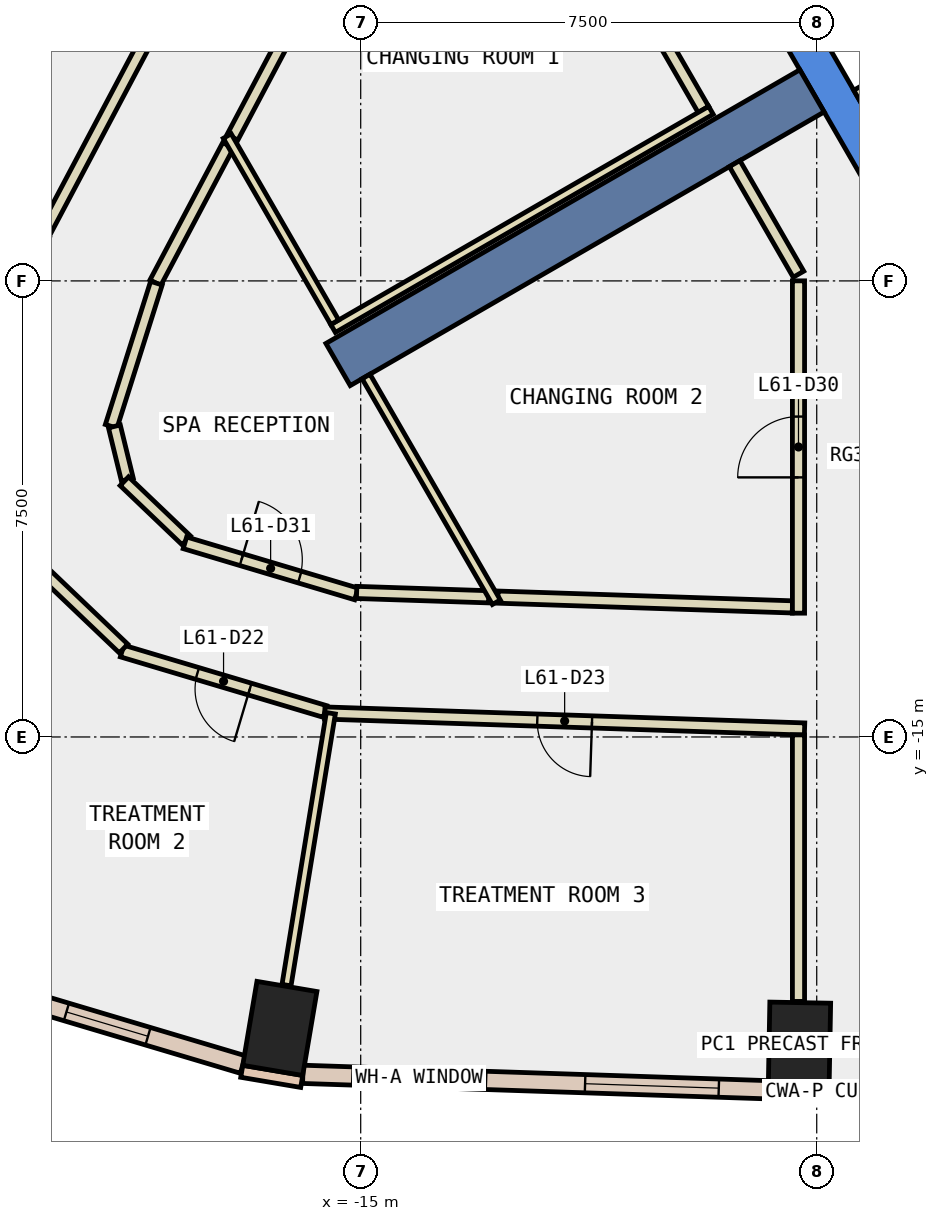
"""IFC4 building model, lengths in metres.
Left out: names, types, materials, properties, quantities, classifications, styles, units other than length and angle.
Written with IfcOpenShell. Run it as: python <this file> out.ifc"""

import sys

from ifc_helpers import new_model, si_unit, direction, frame, frame_2d, origin, origin_2d, place, context, subcontext, project, spatial, polyline, rectangle, outline, extrude, element, fill, save


model = new_model("IFC4")
c1 = context("Model", 3, precision=1e-05, world=origin(), true_north=direction((0.0, 1.0)))
c2 = subcontext(c1, "Body", "Model", "MODEL_VIEW")
j1 = project(units=[si_unit("LENGTHUNIT", "METRE"), si_unit("PLANEANGLEUNIT", "RADIAN")], contexts=[c1])
p1 = place(None, origin())
s1 = spatial("IfcSite", under=j1, at=p1, CompositionType="ELEMENT")
p2 = place(p1, origin())
s2 = spatial("IfcBuilding", under=s1, at=p2, CompositionType="ELEMENT")
p3 = place(p2, frame((0.0, 0.0, 266.6)))
s3 = spatial("IfcBuildingStorey", under=s2, at=p3, CompositionType="ELEMENT", Elevation=266.6)
for number, where, z_axis, x_axis in (
    (1, (-16.33, -19.793, -0.34), (0.0, 0.0, 1.0), (-0.986, 0.167, 0.0)),
    (2, (-7.784, -20.069, -0.34), (0.0, 0.0, 1.0), (-1.0, 0.018, 0.0)),
):
    element("IfcColumn", number, at=place(p3, frame(where, z_axis=z_axis, x_axis=x_axis)), inside=s3, PredefinedType="COLUMN", context=c2, shape_type="SweptSolid", body=[
        extrude(rectangle(XDim=1.0, YDim=1.4, at=origin_2d()), origin(), (0.0, 0.0, 1.0), 3.6),
    ])
p4 = place(p3, frame((0.0, 0.0, -0.34)))
e3 = element("IfcWall", 3, at=p4, inside=s3, PredefinedType="SHEAR", context=c2, shape_type="SweptSolid", body=[
    extrude(outline(polyline([(-11.547, 2.5), (-5.774, -7.5), (-5.427, -6.9), (-10.854, 2.5), (-11.547, 2.5)])), origin(), (0.0, 0.0, 1.0), 3.6),
])
p5 = place(p3, frame((-7.578, -4.375, -0.34), z_axis=(0.0, 0.0, 1.0), x_axis=(-0.866024315419, -0.5000018851, 0.0)))
e4 = element("IfcWall", 4, at=p5, inside=s3, PredefinedType="SHEAR", context=c2, shape_type="SweptSolid", body=[
    extrude(rectangle(XDim=9.0, YDim=0.8, at=frame_2d((4.5, 0.0))), origin(), (0.0, 0.0, 1.0), 3.6),
])
for number, where, z_axis, x_axis in (
    (5, (-16.956, -20.498, 0.0), (0.0, 0.0, 1.0), (0.986, -0.167, 0.0)),
    (6, (-8.298, -20.86, 0.0), (0.0, 0.0, 1.0), (1.0, -0.018, 0.0)),
):
    element("IfcWall", number, at=place(p3, frame(where, z_axis=z_axis, x_axis=x_axis)), inside=s3, PredefinedType="STANDARD", context=c2, shape_type="SweptSolid", body=[
        extrude(rectangle(XDim=1.0, YDim=0.2, at=frame_2d((0.5, 0.0))), origin(), (0.0, 0.0, 1.0), 3.26),
    ])
p6 = place(p3, frame((-15.951, -20.548, 0.0), z_axis=(0.0, 0.0, 1.0), x_axis=(0.999450376985, -0.033150323459, 0.0)))
e7 = element("IfcWall", 7, at=p6, inside=s3, PredefinedType="STANDARD", context=c2, shape_type="SweptSolid", body=[
    extrude(rectangle(XDim=7.659, YDim=0.3, at=frame_2d((3.83, 0.0))), origin(), (0.0, 0.0, 1.0), 3.26),
])
p7 = place(p6, frame((0.815, 0.0, 0.9)))
e8 = element("IfcOpeningElement", 8, at=p7, cuts=e7, PredefinedType="OPENING", context=c2, shape_type="SweptSolid", body=[
    extrude(rectangle(XDim=2.2, YDim=2.0, at=frame_2d((1.1, 1.0))), frame((0.0, 0.16, 0.0), z_axis=(0.0, -1.0, 0.0), x_axis=(1.0, 0.0, 0.0)), (0.0, 0.0, 1.0), 0.32),
])
p8 = place(p6, frame((4.644, 0.0, 0.9)))
e9 = element("IfcOpeningElement", 9, at=p8, cuts=e7, PredefinedType="OPENING", context=c2, shape_type="SweptSolid", body=[
    extrude(rectangle(XDim=2.2, YDim=2.0, at=frame_2d((1.1, 1.0))), frame((0.0, 0.16, 0.0), z_axis=(0.0, -1.0, 0.0), x_axis=(1.0, 0.0, 0.0)), (0.0, 0.0, 1.0), 0.32),
])
p9 = place(p3, frame((-21.401, -19.057, 0.0), z_axis=(0.0, 0.0, 1.0), x_axis=(0.958361270465, -0.285558532131, 0.0)))
e10 = element("IfcWall", 10, at=p9, inside=s3, PredefinedType="STANDARD", context=c2, shape_type="SweptSolid", body=[
    extrude(rectangle(XDim=4.658, YDim=0.3, at=frame_2d((2.329, 0.0))), origin(), (0.0, 0.0, 1.0), 3.26),
])
p10 = place(p9, frame((1.629, 0.0, 0.9)))
e11 = element("IfcOpeningElement", 11, at=p10, cuts=e10, PredefinedType="OPENING", context=c2, shape_type="SweptSolid", body=[
    extrude(rectangle(XDim=1.4, YDim=2.0, at=frame_2d((0.7, 1.0))), frame((0.0, 0.16, 0.0), z_axis=(0.0, -1.0, 0.0), x_axis=(1.0, 0.0, 0.0)), (0.0, 0.0, 1.0), 0.32),
])
p11 = place(p3, frame((-15.56, -2.214, 0.0), z_axis=(0.0, 0.0, 1.0), x_axis=(-0.468104679961, -0.883673021314, 0.0)))
e12 = element("IfcWall", 12, at=p11, inside=s3, PredefinedType="PARTITIONING", context=c2, shape_type="SweptSolid", body=[
    extrude(rectangle(XDim=3.309, YDim=0.2, at=frame_2d((1.654, 0.0))), origin(), (0.0, 0.0, 1.0), 3.26),
])
p12 = place(p3, frame((-12.744, -12.7, 0.0), z_axis=(0.0, 0.0, 1.0), x_axis=(0.999447196828, -0.033246063702, 0.0)))
e13 = element("IfcWall", 13, at=p12, inside=s3, PredefinedType="PARTITIONING", context=c2, shape_type="SweptSolid", body=[
    extrude(rectangle(XDim=4.847, YDim=0.2, at=frame_2d((2.423, 0.0))), origin(), (0.0, 0.0, 1.0), 3.26),
])
p13 = place(p3, frame((-17.18, -5.271, 0.0), z_axis=(0.0, 0.0, 1.0), x_axis=(-0.468212372113, -0.883615965564, 0.0)))
e14 = element("IfcWall", 14, at=p13, inside=s3, PredefinedType="PARTITIONING", context=c2, shape_type="SweptSolid", body=[
    extrude(rectangle(XDim=2.557, YDim=0.2, at=frame_2d((1.278, 0.0))), origin(), (0.0, 0.0, 1.0), 3.26),
])
p14 = place(p3, frame((-18.36, -7.537, 0.0), z_axis=(0.0, 0.0, 1.0), x_axis=(-0.301325410186, -0.953521366922, 0.0)))
e15 = element("IfcWall", 15, at=p14, inside=s3, PredefinedType="PARTITIONING", context=c2, shape_type="SweptSolid", body=[
    extrude(rectangle(XDim=2.469, YDim=0.2, at=frame_2d((1.234, 0.0))), origin(), (0.0, 0.0, 1.0), 3.26),
])
p15 = place(p3, frame((-19.051, -9.893, 0.0), z_axis=(0.0, 0.0, 1.0), x_axis=(0.237162553963, -0.971469980492, 0.0)))
e16 = element("IfcWall", 16, at=p15, inside=s3, PredefinedType="PARTITIONING", context=c2, shape_type="SweptSolid", body=[
    extrude(rectangle(XDim=0.899, YDim=0.2, at=frame_2d((0.449, 0.0))), origin(), (0.0, 0.0, 1.0), 3.26),
])
p16 = place(p3, frame((-18.887, -10.794, 0.0), z_axis=(0.0, 0.0, 1.0), x_axis=(0.723206051435, -0.690632324155, 0.0)))
e17 = element("IfcWall", 17, at=p16, inside=s3, PredefinedType="PARTITIONING", context=c2, shape_type="SweptSolid", body=[
    extrude(rectangle(XDim=1.409, YDim=0.2, at=frame_2d((0.705, 0.0))), origin(), (0.0, 0.0, 1.0), 3.26),
])
p17 = place(p3, frame((-17.891, -11.807, 0.0), z_axis=(0.0, 0.0, 1.0), x_axis=(0.958288558025, -0.28580244848, 0.0)))
e18 = element("IfcWall", 18, at=p17, inside=s3, PredefinedType="PARTITIONING", context=c2, shape_type="SweptSolid", body=[
    extrude(rectangle(XDim=2.943, YDim=0.2, at=frame_2d((1.471, 0.0))), origin(), (0.0, 0.0, 1.0), 3.26),
])
p18 = place(p17, frame((0.971, 0.0, 0.0)))
e19 = element("IfcOpeningElement", 19, at=p18, cuts=e18, PredefinedType="OPENING", context=c2, shape_type="SweptSolid", body=[
    extrude(rectangle(XDim=1.0, YDim=2.1, at=frame_2d((0.5, 1.05))), frame((0.0, 0.11, 0.0), z_axis=(0.0, -1.0, 0.0), x_axis=(1.0, 0.0, 0.0)), (0.0, 0.0, 1.0), 0.22),
])
p19 = place(p3, frame((-15.067, -12.623, 0.0), z_axis=(0.0, 0.0, 1.0), x_axis=(0.99945112134, -0.033127874247, 0.0)))
e20 = element("IfcWall", 20, at=p19, inside=s3, PredefinedType="PARTITIONING", context=c2, shape_type="SweptSolid", body=[
    extrude(rectangle(XDim=2.174, YDim=0.2, at=frame_2d((1.087, 0.0))), origin(), (0.0, 0.0, 1.0), 3.26),
])
p20 = place(p3, frame((-20.229, -6.754, 0.0), z_axis=(0.0, 0.0, 1.0), x_axis=(0.468313568794, 0.883562335822, 0.0)))
e21 = element("IfcWall", 21, at=p20, inside=s3, PredefinedType="PARTITIONING", context=c2, shape_type="SweptSolid", body=[
    extrude(rectangle(XDim=6.216, YDim=0.2, at=frame_2d((3.108, 0.0))), origin(), (0.0, 0.0, 1.0), 3.26),
])
p21 = place(p3, frame((-15.587, -14.581, 0.0), z_axis=(0.0, 0.0, 1.0), x_axis=(-0.958378336681, 0.285501250052, 0.0)))
e22 = element("IfcWall", 22, at=p21, inside=s3, PredefinedType="PARTITIONING", context=c2, shape_type="SweptSolid", body=[
    extrude(rectangle(XDim=3.482, YDim=0.2, at=frame_2d((1.741, 0.0))), origin(), (0.0, 0.0, 1.0), 3.26),
])
p22 = place(p21, frame((1.291, 0.0, 0.0)))
e23 = element("IfcOpeningElement", 23, at=p22, cuts=e22, PredefinedType="OPENING", context=c2, shape_type="SweptSolid", body=[
    extrude(rectangle(XDim=0.9, YDim=2.1, at=frame_2d((0.45, 1.05))), frame((0.0, 0.11, 0.0), z_axis=(0.0, -1.0, 0.0), x_axis=(1.0, 0.0, 0.0)), (0.0, 0.0, 1.0), 0.22),
])
p23 = place(p3, frame((-18.9, -13.546, 0.0), z_axis=(0.0, 0.0, 1.0), x_axis=(-0.723668833869, 0.690147389248, 0.0)))
e24 = element("IfcWall", 24, at=p23, inside=s3, PredefinedType="PARTITIONING", context=c2, shape_type="SweptSolid", body=[
    extrude(rectangle(XDim=2.476, YDim=0.2, at=frame_2d((1.238, 0.0))), origin(), (0.0, 0.0, 1.0), 3.26),
])
p24 = place(p3, frame((-7.7, -14.869, 0.0), z_axis=(0.0, 0.0, 1.0), x_axis=(-0.999445318732, 0.03330247535, 0.0)))
e25 = element("IfcWall", 25, at=p24, inside=s3, PredefinedType="PARTITIONING", context=c2, shape_type="SweptSolid", body=[
    extrude(rectangle(XDim=7.896, YDim=0.2, at=frame_2d((3.948, 0.0))), origin(), (0.0, 0.0, 1.0), 3.26),
])
p25 = place(p24, frame((3.498, 0.0, 0.0)))
e26 = element("IfcOpeningElement", 26, at=p25, cuts=e25, PredefinedType="OPENING", context=c2, shape_type="SweptSolid", body=[
    extrude(rectangle(XDim=0.9, YDim=2.1, at=frame_2d((0.45, 1.05))), frame((0.0, 0.11, 0.0), z_axis=(0.0, -1.0, 0.0), x_axis=(1.0, 0.0, 0.0)), (0.0, 0.0, 1.0), 0.22),
])
p26 = place(p3, frame((-5.888, -3.902, 0.0), z_axis=(0.0, 0.0, 1.0), x_axis=(-0.86621513555, -0.499671230855, 0.0)))
e27 = element("IfcWall", 27, at=p26, inside=s3, PredefinedType="PARTITIONING", context=c2, shape_type="SweptSolid", body=[
    extrude(rectangle(XDim=1.1, YDim=0.2, at=frame_2d((0.55, 0.0))), origin(), (0.0, 0.0, 1.0), 3.26),
])
p27 = place(p3, frame((-9.751, 2.99, 0.0), z_axis=(0.0, 0.0, 1.0), x_axis=(0.500012163284, -0.866018381195, 0.0)))
e28 = element("IfcWall", 28, at=p27, inside=s3, PredefinedType="PARTITIONING", context=c2, shape_type="SweptSolid", body=[
    extrude(rectangle(XDim=8.0, YDim=0.2, at=frame_2d((4.0, 0.0))), origin(), (0.0, 0.0, 1.0), 3.26),
])
p28 = place(p3, frame((-9.364, -4.68, 0.0), z_axis=(0.0, 0.0, 1.0), x_axis=(-0.500052244015, 0.865995238587, 0.0)))
e29 = element("IfcWall", 29, at=p28, inside=s3, PredefinedType="PARTITIONING", context=c2, shape_type="SweptSolid", body=[
    extrude(rectangle(XDim=1.281, YDim=0.2, at=frame_2d((0.641, 0.0))), origin(), (0.0, 0.0, 1.0), 3.26),
])
p29 = place(p3, frame((-7.8, -12.964, 0.0), z_axis=(0.0, 0.0, 1.0), x_axis=(0.0, 1.0, 0.0)))
e30 = element("IfcWall", 30, at=p29, inside=s3, PredefinedType="PARTITIONING", context=c2, shape_type="SweptSolid", body=[
    extrude(rectangle(XDim=5.465, YDim=0.2, at=frame_2d((2.732, 0.0))), origin(), (0.0, 0.0, 1.0), 3.26),
])
p30 = place(p29, frame((2.233, 0.0, 0.0)))
e31 = element("IfcOpeningElement", 31, at=p30, cuts=e30, PredefinedType="OPENING", context=c2, shape_type="SweptSolid", body=[
    extrude(rectangle(XDim=1.0, YDim=2.1, at=frame_2d((0.5, 1.05))), frame((0.0, 0.11, 0.0), z_axis=(0.0, -1.0, 0.0), x_axis=(1.0, 0.0, 0.0)), (0.0, 0.0, 1.0), 0.22),
])
p31 = place(p3, frame((-7.8, -7.39, 0.0), z_axis=(0.0, 0.0, 1.0), x_axis=(-0.499977374825, 0.866038466041, 0.0)))
e32 = element("IfcWall", 32, at=p31, inside=s3, PredefinedType="PARTITIONING", context=c2, shape_type="SweptSolid", body=[
    extrude(rectangle(XDim=2.1, YDim=0.2, at=frame_2d((1.05, 0.0))), origin(), (0.0, 0.0, 1.0), 3.26),
])
p32 = place(p3, frame((-7.8, -19.349, 0.0), z_axis=(0.0, 0.0, 1.0), x_axis=(0.0, 1.0, 0.0)))
e33 = element("IfcWall", 33, at=p32, inside=s3, PredefinedType="PARTITIONING", context=c2, shape_type="SweptSolid", body=[
    extrude(rectangle(XDim=4.383, YDim=0.2, at=frame_2d((2.191, 0.0))), origin(), (0.0, 0.0, 1.0), 3.26),
])
p33 = place(p3, frame((-9.24, -4.695, 0.0), z_axis=(0.0, 0.0, 1.0), x_axis=(-0.866015037582, -0.500017954359, 0.0)))
e34 = element("IfcWall", 34, at=p33, inside=s3, PredefinedType="PARTITIONING", context=c2, shape_type="SweptSolid", body=[
    extrude(rectangle(XDim=7.176, YDim=0.15, at=frame_2d((3.588, 0.0))), origin(), (0.0, 0.0, 1.0), 3.26),
])
p34 = place(p3, frame((-15.427, -8.18, 0.0), z_axis=(0.0, 0.0, 1.0), x_axis=(-0.500045204515, 0.865999303373, 0.0)))
e35 = element("IfcWall", 35, at=p34, inside=s3, PredefinedType="PARTITIONING", context=c2, shape_type="SweptSolid", body=[
    extrude(rectangle(XDim=3.536, YDim=0.15, at=frame_2d((1.768, 0.0))), origin(), (0.0, 0.0, 1.0), 3.26),
])
p35 = place(p3, frame((-12.769, -12.784, 0.0), z_axis=(0.0, 0.0, 1.0), x_axis=(-0.499998569178, 0.866026229868, 0.0)))
e36 = element("IfcWall", 36, at=p35, inside=s3, PredefinedType="PARTITIONING", context=c2, shape_type="SweptSolid", body=[
    extrude(rectangle(XDim=4.286, YDim=0.15, at=frame_2d((2.143, 0.0))), origin(), (0.0, 0.0, 1.0), 3.26),
])
p36 = place(p3, frame((-15.491, -14.61, 0.0), z_axis=(0.0, 0.0, 1.0), x_axis=(-0.160928343418, -0.986966092774, 0.0)))
e37 = element("IfcWall", 37, at=p36, inside=s3, PredefinedType="PARTITIONING", context=c2, shape_type="SweptSolid", body=[
    extrude(rectangle(XDim=4.53, YDim=0.15, at=frame_2d((2.265, 0.0))), origin(), (0.0, 0.0, 1.0), 3.26),
])
p37 = place(p3, frame((-8.192, 0.888, 0.0), z_axis=(0.0, 0.0, 1.0), x_axis=(0.500034260056, -0.866005622828, 0.0)))
e38 = element("IfcWall", 38, at=p37, inside=s3, PredefinedType="STANDARD", context=c2, shape_type="SweptSolid", body=[
    extrude(rectangle(XDim=5.399, YDim=0.2, at=frame_2d((2.7, 0.0))), origin(), (0.0, 0.0, 1.0), 3.26),
])
p38 = place(p7, origin())
e39 = element("IfcWindow", 39, at=p38, inside=s3, PartitioningType="SINGLE_PANEL", PredefinedType="WINDOW", context=c2, shape_type="SweptSolid", body=[
    extrude(rectangle(XDim=2.2, YDim=2.0, at=frame_2d((1.1, 1.0))), frame((0.0, 0.03, 0.0), z_axis=(0.0, -1.0, 0.0), x_axis=(1.0, 0.0, 0.0)), (0.0, 0.0, 1.0), 0.06),
])
fill(e8, e39)
p39 = place(p8, origin())
e40 = element("IfcWindow", 40, at=p39, inside=s3, PartitioningType="SINGLE_PANEL", PredefinedType="WINDOW", context=c2, shape_type="SweptSolid", body=[
    extrude(rectangle(XDim=2.2, YDim=2.0, at=frame_2d((1.1, 1.0))), frame((0.0, 0.03, 0.0), z_axis=(0.0, -1.0, 0.0), x_axis=(1.0, 0.0, 0.0)), (0.0, 0.0, 1.0), 0.06),
])
fill(e9, e40)
p40 = place(p10, origin())
e41 = element("IfcWindow", 41, at=p40, inside=s3, PartitioningType="SINGLE_PANEL", PredefinedType="WINDOW", context=c2, shape_type="SweptSolid", body=[
    extrude(rectangle(XDim=1.4, YDim=2.0, at=frame_2d((0.7, 1.0))), frame((0.0, 0.03, 0.0), z_axis=(0.0, -1.0, 0.0), x_axis=(1.0, 0.0, 0.0)), (0.0, 0.0, 1.0), 0.06),
])
fill(e11, e41)
p41 = place(p22, origin())
e42 = element("IfcDoor", 42, at=p41, inside=s3, OperationType="SINGLE_SWING_LEFT", PredefinedType="DOOR", context=c2, shape_type="SweptSolid", body=[
    extrude(rectangle(XDim=0.9, YDim=2.1, at=frame_2d((0.45, 1.05))), frame((0.0, 0.025, 0.0), z_axis=(0.0, -1.0, 0.0), x_axis=(1.0, 0.0, 0.0)), (0.0, 0.0, 1.0), 0.05),
])
fill(e23, e42)
p42 = place(p25, origin())
e43 = element("IfcDoor", 43, at=p42, inside=s3, OperationType="SINGLE_SWING_LEFT", PredefinedType="DOOR", context=c2, shape_type="SweptSolid", body=[
    extrude(rectangle(XDim=0.9, YDim=2.1, at=frame_2d((0.45, 1.05))), frame((0.0, 0.025, 0.0), z_axis=(0.0, -1.0, 0.0), x_axis=(1.0, 0.0, 0.0)), (0.0, 0.0, 1.0), 0.05),
])
fill(e26, e43)
p43 = place(p30, origin())
e44 = element("IfcDoor", 44, at=p43, inside=s3, OperationType="SINGLE_SWING_LEFT", PredefinedType="DOOR", context=c2, shape_type="SweptSolid", body=[
    extrude(rectangle(XDim=1.0, YDim=2.1, at=frame_2d((0.5, 1.05))), frame((0.0, 0.025, 0.0), z_axis=(0.0, -1.0, 0.0), x_axis=(1.0, 0.0, 0.0)), (0.0, 0.0, 1.0), 0.05),
])
fill(e31, e44)
p44 = place(p18, origin())
e45 = element("IfcDoor", 45, at=p44, inside=s3, OperationType="SINGLE_SWING_LEFT", PredefinedType="DOOR", context=c2, shape_type="SweptSolid", body=[
    extrude(rectangle(XDim=1.0, YDim=2.1, at=frame_2d((0.5, 1.05))), frame((0.0, 0.025, 0.0), z_axis=(0.0, -1.0, 0.0), x_axis=(1.0, 0.0, 0.0)), (0.0, 0.0, 1.0), 0.05),
])
fill(e19, e45)
save(model, sys.argv[1])
